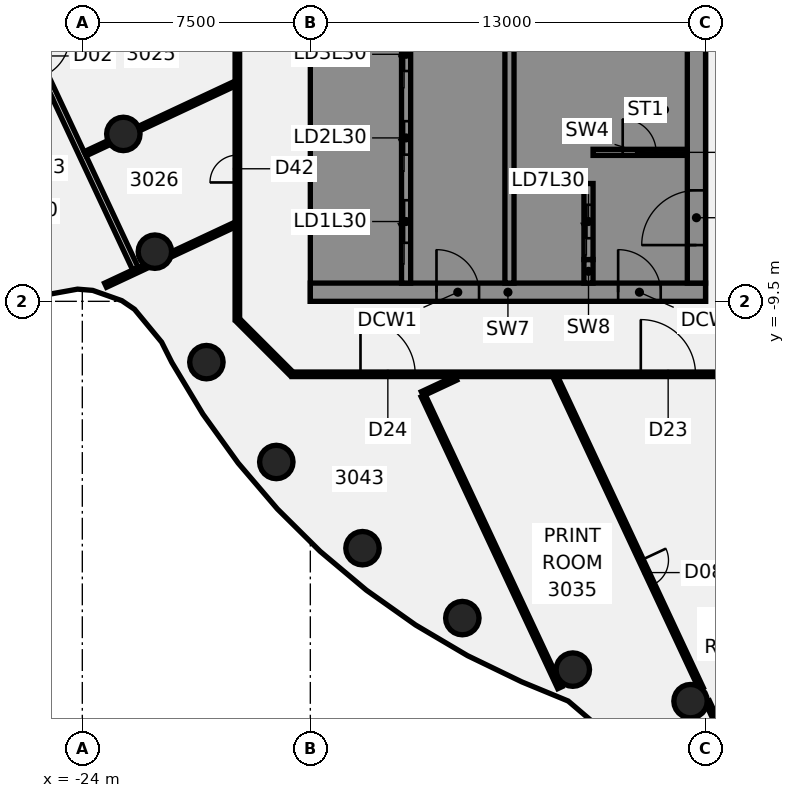
"""IFC4 building model, lengths in metres.
Left out: names, types, materials, properties, quantities, classifications, styles, units other than length and angle.
Written with IfcOpenShell. Run it as: python <this file> out.ifc"""

import sys

from ifc_helpers import new_model, si_unit, direction, frame, frame_2d, origin, origin_2d, place, context, subcontext, project, spatial, polyline, rectangle, circle, outline, extrude, element, fill, save


model = new_model("IFC4")
c1 = context("Model", 3, precision=1e-05, world=origin(), true_north=direction((0.0, 1.0)))
c2 = subcontext(c1, "Body", "Model", "MODEL_VIEW")
j1 = project(units=[si_unit("LENGTHUNIT", "METRE"), si_unit("PLANEANGLEUNIT", "RADIAN")], contexts=[c1])
p1 = place(None, origin())
s1 = spatial("IfcSite", under=j1, at=p1, CompositionType="ELEMENT")
p2 = place(p1, origin())
s2 = spatial("IfcBuilding", under=s1, at=p2, CompositionType="ELEMENT")
p3 = place(p2, frame((0.0, 0.0, 124.75)))
s3 = spatial("IfcBuildingStorey", under=s2, at=p3, CompositionType="ELEMENT", Elevation=124.75)
for number, where, z_axis, x_axis in (
    (1, (-22.651, -3.994, -0.14), (0.0, 0.0, 1.0), (1.0, 0.0, 0.0)),
    (2, (-21.613, -7.866, -0.14), (0.0, 0.0, 1.0), (1.0, 0.0, 0.0)),
    (3, (-19.919, -11.5, -0.14), (0.0, 0.0, 1.0), (1.0, 0.0, 0.0)),
    (4, (-17.619, -14.784, -0.14), (0.0, 0.0, 1.0), (1.0, 0.0, 0.0)),
    (5, (-14.784, -17.619, -0.14), (0.0, 0.0, 1.0), (1.0, 0.0, 0.0)),
    (6, (-11.5, -19.919, -0.14), (0.0, 0.0, 1.0), (1.0, 0.0, 0.0)),
    (7, (-7.866, -21.613, -0.14), (0.0, 0.0, 1.0), (1.0, 0.0, 0.0)),
    (8, (-3.994, -22.651, -0.14), (0.0, 0.0, 1.0), (1.0, 0.0, 0.0)),
):
    element("IfcColumn", number, at=place(p3, frame(where, z_axis=z_axis, x_axis=x_axis)), inside=s3, PredefinedType="COLUMN", context=c2, shape_type="SweptSolid", body=[
        extrude(circle(Radius=0.55, at=origin_2d()), origin(), (0.0, 0.0, 1.0), 3.71),
    ])
p4 = place(p3, frame((-28.281, 4.457, 0.0), z_axis=(0.0, 0.0, 1.0), x_axis=(0.423799855828, -0.90575586236, 0.0)))
e9 = element("IfcWall", 9, at=p4, inside=s3, PredefinedType="PARTITIONING", context=c2, shape_type="SweptSolid", body=[
    extrude(rectangle(XDim=14.219, YDim=0.2, at=frame_2d((7.109, 0.0))), origin(), (0.0, 0.0, 1.0), 2.87),
])
p5 = place(p4, frame((5.8, 0.0, 0.0)))
e10 = element("IfcOpeningElement", 10, at=p5, cuts=e9, PredefinedType="OPENING", context=c2, shape_type="SweptSolid", body=[
    extrude(rectangle(XDim=1.4, YDim=2.1, at=frame_2d((0.7, 1.05))), frame((0.0, 0.11, 0.0), z_axis=(0.0, -1.0, 0.0), x_axis=(1.0, 0.0, 0.0)), (0.0, 0.0, 1.0), 0.22),
])
p6 = place(p3, frame((-12.785, -12.608, 0.0), z_axis=(0.0, 0.0, 1.0), x_axis=(0.423824721298, -0.905744227482, 0.0)))
e11 = element("IfcWall", 11, at=p6, inside=s3, PredefinedType="PARTITIONING", context=c2, shape_type="SweptSolid", body=[
    extrude(rectangle(XDim=10.599, YDim=0.15, at=frame_2d((5.299, 0.0))), origin(), (0.0, 0.0, 1.0), 2.97),
])
p7 = place(p3, frame((-8.438, -11.99, 0.0), z_axis=(0.0, 0.0, 1.0), x_axis=(0.423822202293, -0.905745406195, 0.0)))
e12 = element("IfcWall", 12, at=p7, inside=s3, PredefinedType="PARTITIONING", context=c2, shape_type="SweptSolid", body=[
    extrude(rectangle(XDim=11.312, YDim=0.15, at=frame_2d((5.656, 0.0))), origin(), (0.0, 0.0, 1.0), 2.97),
])
p8 = place(p7, frame((6.65, 0.0, 0.0)))
e13 = element("IfcOpeningElement", 13, at=p8, cuts=e12, PredefinedType="OPENING", context=c2, shape_type="SweptSolid", body=[
    extrude(rectangle(XDim=0.9, YDim=2.1, at=frame_2d((0.45, 1.05))), frame((0.0, 0.085, 0.0), z_axis=(0.0, -1.0, 0.0), x_axis=(1.0, 0.0, 0.0)), (0.0, 0.0, 1.0), 0.17),
])
p9 = place(p3, frame((-3.44, -22.672, 0.0), z_axis=(0.0, 0.0, 1.0), x_axis=(0.423855723132, -0.905729720153, 0.0)))
e14 = element("IfcWall", 14, at=p9, inside=s3, PredefinedType="PARTITIONING", context=c2, shape_type="SweptSolid", body=[
    extrude(rectangle(XDim=4.545, YDim=0.15, at=frame_2d((2.272, 0.0))), origin(), (0.0, 0.0, 1.0), 2.97),
])
p10 = place(p3, frame((-18.872, -10.128, 0.0), z_axis=(0.0, 0.0, 1.0), x_axis=(0.707106781187, -0.707106781187, 0.0)))
e15 = element("IfcWall", 15, at=p10, inside=s3, PredefinedType="PARTITIONING", context=c2, shape_type="SweptSolid", body=[
    extrude(rectangle(XDim=2.465, YDim=0.15, at=frame_2d((1.232, 0.0))), origin(), (0.0, 0.0, 1.0), 2.97),
])
p11 = place(p3, frame((-17.1, -11.9, 0.0), z_axis=(0.0, 0.0, 1.0), x_axis=(1.0, 0.0, 0.0)))
e16 = element("IfcWall", 16, at=p11, inside=s3, PredefinedType="PARTITIONING", context=c2, shape_type="SweptSolid", body=[
    extrude(rectangle(XDim=34.165, YDim=0.15, at=frame_2d((17.083, 0.0))), origin(), (0.0, 0.0, 1.0), 2.97),
])
p12 = place(p11, frame((11.47, 0.0, 0.0)))
e17 = element("IfcOpeningElement", 17, at=p12, cuts=e16, PredefinedType="OPENING", context=c2, shape_type="SweptSolid", body=[
    extrude(rectangle(XDim=1.8, YDim=2.1, at=frame_2d((0.9, 1.05))), frame((0.0, 0.085, 0.0), z_axis=(0.0, -1.0, 0.0), x_axis=(1.0, 0.0, 0.0)), (0.0, 0.0, 1.0), 0.17),
])
p13 = place(p11, frame((2.25, 0.0, 0.0)))
e18 = element("IfcOpeningElement", 18, at=p13, cuts=e16, PredefinedType="OPENING", context=c2, shape_type="SweptSolid", body=[
    extrude(rectangle(XDim=1.8, YDim=2.1, at=frame_2d((0.9, 1.05))), frame((0.0, 0.085, 0.0), z_axis=(0.0, -1.0, 0.0), x_axis=(1.0, 0.0, 0.0)), (0.0, 0.0, 1.0), 0.17),
])
p14 = place(p11, frame((26.465, 0.0, 0.0)))
e19 = element("IfcOpeningElement", 19, at=p14, cuts=e16, PredefinedType="OPENING", context=c2, shape_type="SweptSolid", body=[
    extrude(rectangle(XDim=1.8, YDim=2.1, at=frame_2d((0.9, 1.05))), frame((0.0, 0.085, 0.0), z_axis=(0.0, -1.0, 0.0), x_axis=(1.0, 0.0, 0.0)), (0.0, 0.0, 1.0), 0.17),
])
p15 = place(p3, frame((-37.093, -8.387, 0.0), z_axis=(0.0, 0.0, 1.0), x_axis=(0.905765973865, 0.423778244591, 0.0)))
e20 = element("IfcWall", 20, at=p15, inside=s3, PredefinedType="PARTITIONING", context=c2, shape_type="SweptSolid", body=[
    extrude(rectangle(XDim=13.321, YDim=0.15, at=frame_2d((6.66, 0.0))), origin(), (0.0, 0.0, 1.0), 2.87),
])
p16 = place(p15, frame((5.175, 0.0, 0.0)))
e21 = element("IfcOpeningElement", 21, at=p16, cuts=e20, PredefinedType="OPENING", context=c2, shape_type="SweptSolid", body=[
    extrude(rectangle(XDim=0.9, YDim=2.1, at=frame_2d((0.45, 1.05))), frame((0.0, 0.085, 0.0), z_axis=(0.0, -1.0, 0.0), x_axis=(1.0, 0.0, 0.0)), (0.0, 0.0, 1.0), 0.17),
])
p17 = place(p15, frame((9.825, 0.0, 0.0)))
e22 = element("IfcOpeningElement", 22, at=p17, cuts=e20, PredefinedType="OPENING", context=c2, shape_type="SweptSolid", body=[
    extrude(rectangle(XDim=1.8, YDim=2.1, at=frame_2d((0.9, 1.05))), frame((0.0, 0.085, 0.0), z_axis=(0.0, -1.0, 0.0), x_axis=(1.0, 0.0, 0.0)), (0.0, 0.0, 1.0), 0.17),
])
p18 = place(p3, frame((-23.906, -4.646, 0.0), z_axis=(0.0, 0.0, 1.0), x_axis=(0.905776114627, 0.423756569473, 0.0)))
e23 = element("IfcWall", 23, at=p18, inside=s3, PredefinedType="PARTITIONING", context=c2, shape_type="SweptSolid", body=[
    extrude(rectangle(XDim=0.859, YDim=0.15, at=frame_2d((0.43, 0.0))), origin(), (0.0, 0.0, 1.0), 2.87),
])
p19 = place(p3, frame((-22.138, -3.818, 0.0), z_axis=(0.0, 0.0, 1.0), x_axis=(0.90574646987, 0.423819929118, 0.0)))
e24 = element("IfcWall", 24, at=p19, inside=s3, PredefinedType="PARTITIONING", context=c2, shape_type="SweptSolid", body=[
    extrude(rectangle(XDim=3.475, YDim=0.15, at=frame_2d((1.737, 0.0))), origin(), (0.0, 0.0, 1.0), 2.97),
])
p20 = place(p3, frame((-23.236, -8.969, 0.0), z_axis=(0.0, 0.0, 1.0), x_axis=(0.905683464585, 0.423954551783, 0.0)))
e25 = element("IfcWall", 25, at=p20, inside=s3, PredefinedType="PARTITIONING", context=c2, shape_type="SweptSolid", body=[
    extrude(rectangle(XDim=1.475, YDim=0.15, at=frame_2d((0.737, 0.0))), origin(), (0.0, 0.0, 1.0), 2.97),
])
p21 = place(p3, frame((-21.078, -7.959, 0.0), z_axis=(0.0, 0.0, 1.0), x_axis=(0.905695418717, 0.423929013533, 0.0)))
e26 = element("IfcWall", 26, at=p21, inside=s3, PredefinedType="PARTITIONING", context=c2, shape_type="SweptSolid", body=[
    extrude(rectangle(XDim=2.305, YDim=0.15, at=frame_2d((1.152, 0.0))), origin(), (0.0, 0.0, 1.0), 2.97),
])
p22 = place(p3, frame((-12.817, -12.54, 0.0), z_axis=(0.0, 0.0, 1.0), x_axis=(0.905880352608, 0.423533690229, 0.0)))
e27 = element("IfcWall", 27, at=p22, inside=s3, PredefinedType="PARTITIONING", context=c2, shape_type="SweptSolid", body=[
    extrude(rectangle(XDim=1.216, YDim=0.15, at=frame_2d((0.608, 0.0))), origin(), (0.0, 0.0, 1.0), 2.97),
])
p23 = place(p3, frame((-4.457, -28.281, 0.0), z_axis=(0.0, 0.0, 1.0), x_axis=(0.905756469358, 0.423798558534, 0.0)))
e28 = element("IfcWall", 28, at=p23, inside=s3, PredefinedType="PARTITIONING", context=c2, shape_type="SweptSolid", body=[
    extrude(rectangle(XDim=14.239, YDim=0.2, at=frame_2d((7.12, 0.0))), origin(), (0.0, 0.0, 1.0), 2.87),
])
p24 = place(p23, frame((5.8, 0.0, 0.0)))
e29 = element("IfcOpeningElement", 29, at=p24, cuts=e28, PredefinedType="OPENING", context=c2, shape_type="SweptSolid", body=[
    extrude(rectangle(XDim=1.4, YDim=2.1, at=frame_2d((0.7, 1.05))), frame((0.0, 0.11, 0.0), z_axis=(0.0, -1.0, 0.0), x_axis=(1.0, 0.0, 0.0)), (0.0, 0.0, 1.0), 0.22),
])
p25 = place(p3, frame((-18.9, -10.1, 0.0), z_axis=(0.0, 0.0, 1.0), x_axis=(0.0, 1.0, 0.0)))
e30 = element("IfcWall", 30, at=p25, inside=s3, PredefinedType="PARTITIONING", context=c2, shape_type="SweptSolid", body=[
    extrude(rectangle(XDim=20.2, YDim=0.15, at=frame_2d((10.1, 0.0))), origin(), (0.0, 0.0, 1.0), 2.97),
])
p26 = place(p25, frame((11.547, 0.0, 0.0)))
e31 = element("IfcOpeningElement", 31, at=p26, cuts=e30, PredefinedType="OPENING", context=c2, shape_type="SweptSolid", body=[
    extrude(rectangle(XDim=1.8, YDim=2.1, at=frame_2d((0.9, 1.05))), frame((0.0, 0.085, 0.0), z_axis=(0.0, -1.0, 0.0), x_axis=(1.0, 0.0, 0.0)), (0.0, 0.0, 1.0), 0.17),
])
p27 = place(p25, frame((4.51, 0.0, 0.0)))
e32 = element("IfcOpeningElement", 32, at=p27, cuts=e30, PredefinedType="OPENING", context=c2, shape_type="SweptSolid", body=[
    extrude(rectangle(XDim=0.9, YDim=2.1, at=frame_2d((0.45, 1.05))), frame((0.0, 0.085, 0.0), z_axis=(0.0, -1.0, 0.0), x_axis=(1.0, 0.0, 0.0)), (0.0, 0.0, 1.0), 0.17),
])
p28 = place(p3, frame((-16.5, -9.2, 0.0), z_axis=(0.0, 0.0, 1.0), x_axis=(1.0, 0.0, 0.0)))
e33 = element("IfcWall", 33, at=p28, inside=s3, PredefinedType="SHEAR", context=c2, shape_type="SweptSolid", body=[
    extrude(rectangle(XDim=13.0, YDim=0.6, at=frame_2d((6.5, 0.0))), origin(), (0.0, 0.0, 1.0), 3.57),
])
p29 = place(p28, frame((4.15, 0.0, 0.0)))
e34 = element("IfcOpeningElement", 34, at=p29, cuts=e33, PredefinedType="OPENING", context=c2, shape_type="SweptSolid", body=[
    extrude(rectangle(XDim=1.4, YDim=2.1, at=frame_2d((0.7, 1.05))), frame((0.0, 0.31, 0.0), z_axis=(0.0, -1.0, 0.0), x_axis=(1.0, 0.0, 0.0)), (0.0, 0.0, 1.0), 0.62),
])
p30 = place(p28, frame((10.125, 0.0, 0.0)))
e35 = element("IfcOpeningElement", 35, at=p30, cuts=e33, PredefinedType="OPENING", context=c2, shape_type="SweptSolid", body=[
    extrude(rectangle(XDim=1.4, YDim=2.1, at=frame_2d((0.7, 1.05))), frame((0.0, 0.31, 0.0), z_axis=(0.0, -1.0, 0.0), x_axis=(1.0, 0.0, 0.0)), (0.0, 0.0, 1.0), 0.62),
])
p31 = place(p3, origin())
e36 = element("IfcWall", 36, at=p31, inside=s3, PredefinedType="SHEAR", context=c2, shape_type="SweptSolid", body=[
    extrude(outline(polyline([(-13.5, -8.9), (-13.5, -8.125), (-15.9, -8.125), (-15.9, -5.625), (-13.5, -5.625), (-13.5, -5.375), (-15.9, -5.375), (-15.9, -2.875), (-13.5, -2.875), (-13.5, -2.625), (-15.9, -2.625), (-15.9, -0.125), (-13.5, -0.125), (-13.5, 0.125), (-15.9, 0.125), (-15.9, 2.625), (-13.5, 2.625), (-13.5, 2.875), (-15.9, 2.875), (-15.9, 5.375), (-13.5, 5.375), (-13.5, 5.625), (-15.9, 5.625), (-15.9, 8.125), (-13.5, 8.125), (-13.5, 8.9), (-15.9, 8.9), (-16.5, 8.9), (-16.5, -8.9), (-15.9, -8.9), (-13.5, -8.9)])), origin(), (0.0, 0.0, 1.0), 3.57),
])
p32 = place(p3, origin())
e37 = element("IfcWall", 37, at=p32, inside=s3, PredefinedType="SHEAR", context=c2, shape_type="SweptSolid", body=[
    extrude(outline(polyline([(-9.8, -5.375), (-9.8, -5.625), (-7.5, -5.625), (-7.2, -5.625), (-7.2, 8.9), (-7.5, 8.9), (-9.8, 8.9), (-9.8, 8.125), (-7.5, 8.125), (-7.5, 5.625), (-9.8, 5.625), (-9.8, 5.375), (-7.5, 5.375), (-7.5, 2.875), (-9.8, 2.875), (-9.8, 2.625), (-7.5, 2.625), (-7.5, 0.125), (-9.8, 0.125), (-9.8, -0.125), (-7.5, -0.125), (-7.5, -2.625), (-9.8, -2.625), (-9.8, -2.875), (-7.5, -2.875), (-7.5, -5.375), (-9.8, -5.375)])), origin(), (0.0, 0.0, 1.0), 3.57),
])
p33 = place(p3, origin())
e38 = element("IfcWall", 38, at=p33, inside=s3, PredefinedType="SHEAR", context=c2, shape_type="SweptSolid", body=[
    extrude(outline(polyline([(-7.5, -8.125), (-9.55, -8.125), (-9.55, -5.625), (-9.8, -5.625), (-9.8, -8.125), (-9.8, -8.9), (-7.5, -8.9), (-7.5, -8.125)])), origin(), (0.0, 0.0, 1.0), 3.57),
])
p34 = place(p3, frame((-7.35, -8.9, 0.0), z_axis=(0.0, 0.0, 1.0), x_axis=(0.0, 1.0, 0.0)))
e39 = element("IfcWall", 39, at=p34, inside=s3, PredefinedType="SHEAR", context=c2, shape_type="SweptSolid", body=[
    extrude(rectangle(XDim=0.775, YDim=0.3, at=frame_2d((0.387, 0.0))), origin(), (0.0, 0.0, 1.0), 3.57),
])
p35 = place(p3, frame((-13.35, -8.9, 0.0), z_axis=(0.0, 0.0, 1.0), x_axis=(0.0, 1.0, 0.0)))
e40 = element("IfcWall", 40, at=p35, inside=s3, PredefinedType="SHEAR", context=c2, shape_type="SweptSolid", body=[
    extrude(rectangle(XDim=17.8, YDim=0.3, at=frame_2d((8.9, 0.0))), origin(), (0.0, 0.0, 1.0), 3.57),
])
p36 = place(p35, frame((1.325, 0.0, 0.0)))
e41 = element("IfcOpeningElement", 41, at=p36, cuts=e40, PredefinedType="OPENING", context=c2, shape_type="SweptSolid", body=[
    extrude(rectangle(XDim=1.4, YDim=2.1, at=frame_2d((0.7, 1.05))), frame((0.0, 0.16, 0.0), z_axis=(0.0, -1.0, 0.0), x_axis=(1.0, 0.0, 0.0)), (0.0, 0.0, 1.0), 0.32),
])
p37 = place(p35, frame((4.225, 0.0, 0.0)))
e42 = element("IfcOpeningElement", 42, at=p37, cuts=e40, PredefinedType="OPENING", context=c2, shape_type="SweptSolid", body=[
    extrude(rectangle(XDim=1.1, YDim=2.1, at=frame_2d((0.55, 1.05))), frame((0.0, 0.16, 0.0), z_axis=(0.0, -1.0, 0.0), x_axis=(1.0, 0.0, 0.0)), (0.0, 0.0, 1.0), 0.32),
])
p38 = place(p35, frame((6.975, 0.0, 0.0)))
e43 = element("IfcOpeningElement", 43, at=p38, cuts=e40, PredefinedType="OPENING", context=c2, shape_type="SweptSolid", body=[
    extrude(rectangle(XDim=1.1, YDim=2.1, at=frame_2d((0.55, 1.05))), frame((0.0, 0.16, 0.0), z_axis=(0.0, -1.0, 0.0), x_axis=(1.0, 0.0, 0.0)), (0.0, 0.0, 1.0), 0.32),
])
p39 = place(p35, frame((9.725, 0.0, 0.0)))
e44 = element("IfcOpeningElement", 44, at=p39, cuts=e40, PredefinedType="OPENING", context=c2, shape_type="SweptSolid", body=[
    extrude(rectangle(XDim=1.1, YDim=2.1, at=frame_2d((0.55, 1.05))), frame((0.0, 0.16, 0.0), z_axis=(0.0, -1.0, 0.0), x_axis=(1.0, 0.0, 0.0)), (0.0, 0.0, 1.0), 0.32),
])
p40 = place(p35, frame((12.475, 0.0, 0.0)))
e45 = element("IfcOpeningElement", 45, at=p40, cuts=e40, PredefinedType="OPENING", context=c2, shape_type="SweptSolid", body=[
    extrude(rectangle(XDim=1.1, YDim=2.1, at=frame_2d((0.55, 1.05))), frame((0.0, 0.16, 0.0), z_axis=(0.0, -1.0, 0.0), x_axis=(1.0, 0.0, 0.0)), (0.0, 0.0, 1.0), 0.32),
])
p41 = place(p3, frame((-9.95, -8.9, 0.0), z_axis=(0.0, 0.0, 1.0), x_axis=(0.0, 1.0, 0.0)))
e46 = element("IfcWall", 46, at=p41, inside=s3, PredefinedType="SHEAR", context=c2, shape_type="SweptSolid", body=[
    extrude(rectangle(XDim=17.8, YDim=0.3, at=frame_2d((8.9, 0.0))), origin(), (0.0, 0.0, 1.0), 3.57),
])
p42 = place(p3, frame((-7.35, -8.125, 0.0), z_axis=(0.0, 0.0, 1.0), x_axis=(0.0, 1.0, 0.0)))
e47 = element("IfcWall", 47, at=p42, inside=s3, PredefinedType="SHEAR", context=c2, shape_type="SweptSolid", body=[
    extrude(rectangle(XDim=2.5, YDim=0.3, at=frame_2d((1.25, 0.0))), origin(), (0.0, 0.0, 1.0), 3.57),
])
p43 = place(p42, frame((0.7, 0.0, 0.0)))
e48 = element("IfcOpeningElement", 48, at=p43, cuts=e47, PredefinedType="OPENING", context=c2, shape_type="SweptSolid", body=[
    extrude(rectangle(XDim=1.1, YDim=2.1, at=frame_2d((0.55, 1.05))), frame((0.0, 0.16, 0.0), z_axis=(0.0, -1.0, 0.0), x_axis=(1.0, 0.0, 0.0)), (0.0, 0.0, 1.0), 0.32),
])
p44 = place(p3, frame((-3.8, -8.9, 0.0), z_axis=(0.0, 0.0, 1.0), x_axis=(0.0, 1.0, 0.0)))
e49 = element("IfcWall", 49, at=p44, inside=s3, PredefinedType="SHEAR", context=c2, shape_type="SweptSolid", body=[
    extrude(rectangle(XDim=17.8, YDim=0.6, at=frame_2d((8.9, 0.0))), origin(), (0.0, 0.0, 1.0), 3.57),
])
p45 = place(p44, frame((1.25, 0.0, 0.0)))
e50 = element("IfcOpeningElement", 50, at=p45, cuts=e49, PredefinedType="OPENING", context=c2, shape_type="SweptSolid", body=[
    extrude(rectangle(XDim=1.8, YDim=2.1, at=frame_2d((0.9, 1.05))), frame((0.0, 0.31, 0.0), z_axis=(0.0, -1.0, 0.0), x_axis=(1.0, 0.0, 0.0)), (0.0, 0.0, 1.0), 0.62),
])
p46 = place(p44, frame((12.377, 0.0, 0.0)))
e51 = element("IfcOpeningElement", 51, at=p46, cuts=e49, PredefinedType="OPENING", context=c2, shape_type="SweptSolid", body=[
    extrude(rectangle(XDim=1.0, YDim=2.1, at=frame_2d((0.5, 1.05))), frame((0.0, 0.31, 0.0), z_axis=(0.0, -1.0, 0.0), x_axis=(1.0, 0.0, 0.0)), (0.0, 0.0, 1.0), 0.62),
])
p47 = place(p44, frame((15.903, 0.0, 0.0)))
e52 = element("IfcOpeningElement", 52, at=p47, cuts=e49, PredefinedType="OPENING", context=c2, shape_type="SweptSolid", body=[
    extrude(rectangle(XDim=1.0, YDim=2.1, at=frame_2d((0.5, 1.05))), frame((0.0, 0.31, 0.0), z_axis=(0.0, -1.0, 0.0), x_axis=(1.0, 0.0, 0.0)), (0.0, 0.0, 1.0), 0.62),
])
p48 = place(p3, frame((-7.2, -4.6, 0.0), z_axis=(0.0, 0.0, 1.0), x_axis=(1.0, 0.0, 0.0)))
e53 = element("IfcWall", 53, at=p48, inside=s3, PredefinedType="SHEAR", context=c2, shape_type="SweptSolid", body=[
    extrude(rectangle(XDim=3.1, YDim=0.2, at=frame_2d((1.55, 0.0))), origin(), (0.0, 0.0, 1.0), 3.57),
])
p49 = place(p48, frame((0.975, 0.0, 0.0)))
e54 = element("IfcOpeningElement", 54, at=p49, cuts=e53, PredefinedType="OPENING", context=c2, shape_type="SweptSolid", body=[
    extrude(rectangle(XDim=1.1, YDim=2.1, at=frame_2d((0.55, 1.05))), frame((0.0, 0.11, 0.0), z_axis=(0.0, -1.0, 0.0), x_axis=(1.0, 0.0, 0.0)), (0.0, 0.0, 1.0), 0.22),
])
p50 = place(p8, frame((0.9, 0.0, 0.0), z_axis=(0.0, 0.0, 1.0), x_axis=(-1.0, 0.0, 0.0)))
e55 = element("IfcDoor", 55, at=p50, inside=s3, OperationType="SINGLE_SWING_RIGHT", PredefinedType="DOOR", context=c2, shape_type="SweptSolid", body=[
    extrude(rectangle(XDim=0.9, YDim=2.1, at=frame_2d((0.45, 1.05))), frame((0.0, 0.025, 0.0), z_axis=(0.0, -1.0, 0.0), x_axis=(1.0, 0.0, 0.0)), (0.0, 0.0, 1.0), 0.05),
])
fill(e13, e55)
p51 = place(p12, origin())
e56 = element("IfcDoor", 56, at=p51, inside=s3, OperationType="DOUBLE_DOOR_SINGLE_SWING", PredefinedType="DOOR", context=c2, shape_type="SweptSolid", body=[
    extrude(rectangle(XDim=1.8, YDim=2.1, at=frame_2d((0.9, 1.05))), frame((0.0, 0.025, 0.0), z_axis=(0.0, -1.0, 0.0), x_axis=(1.0, 0.0, 0.0)), (0.0, 0.0, 1.0), 0.05),
])
fill(e17, e56)
p52 = place(p13, frame((1.8, 0.0, 0.0), z_axis=(0.0, 0.0, 1.0), x_axis=(-1.0, 0.0, 0.0)))
e57 = element("IfcDoor", 57, at=p52, inside=s3, OperationType="DOUBLE_DOOR_SINGLE_SWING", PredefinedType="DOOR", context=c2, shape_type="SweptSolid", body=[
    extrude(rectangle(XDim=1.8, YDim=2.1, at=frame_2d((0.9, 1.05))), frame((0.0, 0.025, 0.0), z_axis=(0.0, -1.0, 0.0), x_axis=(1.0, 0.0, 0.0)), (0.0, 0.0, 1.0), 0.05),
])
fill(e18, e57)
p53 = place(p27, origin())
e58 = element("IfcDoor", 58, at=p53, inside=s3, OperationType="SINGLE_SWING_RIGHT", PredefinedType="DOOR", context=c2, shape_type="SweptSolid", body=[
    extrude(rectangle(XDim=0.9, YDim=2.1, at=frame_2d((0.45, 1.05))), frame((0.0, 0.025, 0.0), z_axis=(0.0, -1.0, 0.0), x_axis=(1.0, 0.0, 0.0)), (0.0, 0.0, 1.0), 0.05),
])
fill(e32, e58)
p54 = place(p29, origin())
e59 = element("IfcDoor", 59, at=p54, inside=s3, OperationType="SINGLE_SWING_LEFT", PredefinedType="DOOR", context=c2, shape_type="SweptSolid", body=[
    extrude(rectangle(XDim=1.4, YDim=2.1, at=frame_2d((0.7, 1.05))), frame((0.0, 0.025, 0.0), z_axis=(0.0, -1.0, 0.0), x_axis=(1.0, 0.0, 0.0)), (0.0, 0.0, 1.0), 0.05),
])
fill(e34, e59)
p55 = place(p30, origin())
e60 = element("IfcDoor", 60, at=p55, inside=s3, OperationType="SINGLE_SWING_LEFT", PredefinedType="DOOR", context=c2, shape_type="SweptSolid", body=[
    extrude(rectangle(XDim=1.4, YDim=2.1, at=frame_2d((0.7, 1.05))), frame((0.0, 0.025, 0.0), z_axis=(0.0, -1.0, 0.0), x_axis=(1.0, 0.0, 0.0)), (0.0, 0.0, 1.0), 0.05),
])
fill(e35, e60)
p56 = place(p45, origin())
e61 = element("IfcDoor", 61, at=p56, inside=s3, OperationType="SINGLE_SWING_LEFT", PredefinedType="DOOR", context=c2, shape_type="SweptSolid", body=[
    extrude(rectangle(XDim=1.8, YDim=2.1, at=frame_2d((0.9, 1.05))), frame((0.0, 0.025, 0.0), z_axis=(0.0, -1.0, 0.0), x_axis=(1.0, 0.0, 0.0)), (0.0, 0.0, 1.0), 0.05),
])
fill(e50, e61)
p57 = place(p49, origin())
e62 = element("IfcDoor", 62, at=p57, inside=s3, OperationType="SINGLE_SWING_LEFT", PredefinedType="DOOR", context=c2, shape_type="SweptSolid", body=[
    extrude(rectangle(XDim=1.1, YDim=2.1, at=frame_2d((0.55, 1.05))), frame((0.0, 0.025, 0.0), z_axis=(0.0, -1.0, 0.0), x_axis=(1.0, 0.0, 0.0)), (0.0, 0.0, 1.0), 0.05),
])
fill(e54, e62)
p58 = place(p36, origin())
e63 = element("IfcDoor", 63, at=p58, inside=s3, OperationType="SLIDING_TO_LEFT", PredefinedType="DOOR", context=c2, shape_type="SweptSolid", body=[
    extrude(rectangle(XDim=1.4, YDim=2.1, at=frame_2d((0.7, 1.05))), frame((0.0, 0.025, 0.0), z_axis=(0.0, -1.0, 0.0), x_axis=(1.0, 0.0, 0.0)), (0.0, 0.0, 1.0), 0.05),
])
fill(e41, e63)
p59 = place(p37, origin())
e64 = element("IfcDoor", 64, at=p59, inside=s3, OperationType="SLIDING_TO_LEFT", PredefinedType="DOOR", context=c2, shape_type="SweptSolid", body=[
    extrude(rectangle(XDim=1.1, YDim=2.1, at=frame_2d((0.55, 1.05))), frame((0.0, 0.025, 0.0), z_axis=(0.0, -1.0, 0.0), x_axis=(1.0, 0.0, 0.0)), (0.0, 0.0, 1.0), 0.05),
])
fill(e42, e64)
p60 = place(p38, origin())
e65 = element("IfcDoor", 65, at=p60, inside=s3, OperationType="SLIDING_TO_LEFT", PredefinedType="DOOR", context=c2, shape_type="SweptSolid", body=[
    extrude(rectangle(XDim=1.1, YDim=2.1, at=frame_2d((0.55, 1.05))), frame((0.0, 0.025, 0.0), z_axis=(0.0, -1.0, 0.0), x_axis=(1.0, 0.0, 0.0)), (0.0, 0.0, 1.0), 0.05),
])
fill(e43, e65)
p61 = place(p43, origin())
e66 = element("IfcDoor", 66, at=p61, inside=s3, OperationType="SLIDING_TO_LEFT", PredefinedType="DOOR", context=c2, shape_type="SweptSolid", body=[
    extrude(rectangle(XDim=1.1, YDim=2.1, at=frame_2d((0.55, 1.05))), frame((0.0, 0.025, 0.0), z_axis=(0.0, -1.0, 0.0), x_axis=(1.0, 0.0, 0.0)), (0.0, 0.0, 1.0), 0.05),
])
fill(e48, e66)
save(model, sys.argv[1])
